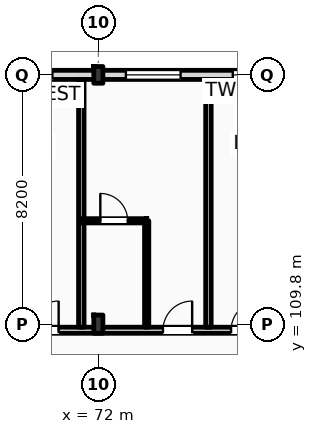
"""IFC4 building model, lengths in metres.
Left out: names, types, materials, properties, quantities, classifications, styles, units other than length and angle.
Written with IfcOpenShell. Run it as: python <this file> out.ifc"""

import sys

from ifc_helpers import new_model, si_unit, direction, frame, frame_2d, origin, origin_2d, place, context, subcontext, project, spatial, rectangle, i_section, extrude, element, fill, save


model = new_model("IFC4")
c1 = context("Model", 3, precision=1e-05, world=origin(), true_north=direction((0.0, 1.0)))
c2 = subcontext(c1, "Body", "Model", "MODEL_VIEW")
j1 = project(units=[si_unit("LENGTHUNIT", "METRE"), si_unit("PLANEANGLEUNIT", "RADIAN")], contexts=[c1])
p1 = place(None, origin())
s1 = spatial("IfcSite", under=j1, at=p1, CompositionType="ELEMENT")
p2 = place(p1, origin())
s2 = spatial("IfcBuilding", under=s1, at=p2, CompositionType="ELEMENT")
p3 = place(p2, frame((0.0, 0.0, 16.2)))
s3 = spatial("IfcBuildingStorey", under=s2, at=p3, CompositionType="ELEMENT", Elevation=16.2)
p4 = place(p3, frame((72.0, 109.8, 0.0), z_axis=(0.0, 0.0, 1.0), x_axis=(1.0, 0.0, 0.0)))
e1 = element("IfcColumn", 1, at=p4, inside=s3, PredefinedType="COLUMN", context=c2, shape_type="SweptSolid", body=[
    extrude(i_section(OverallWidth=0.3, OverallDepth=0.6, WebThickness=0.015, FlangeThickness=0.03, FilletRadius=0.027, at=origin_2d()), origin(), (0.0, 0.0, 1.0), 4.2),
])
p5 = place(p3, frame((72.0, 118.0, 0.0), z_axis=(0.0, 0.0, 1.0), x_axis=(1.0, 0.0, 0.0)))
e2 = element("IfcColumn", 2, at=p5, inside=s3, PredefinedType="COLUMN", context=c2, shape_type="SweptSolid", body=[
    extrude(i_section(OverallWidth=0.3, OverallDepth=0.55, WebThickness=0.015, FlangeThickness=0.029, FilletRadius=0.027, at=origin_2d()), origin(), (0.0, 0.0, 1.0), 4.2),
])
p6 = place(p3, frame((22.5, 118.0, 0.0), z_axis=(0.0, 0.0, 1.0), x_axis=(1.0, 0.0, 0.0)))
e3 = element("IfcWall", 3, at=p6, inside=s3, PredefinedType="STANDARD", context=c2, shape_type="SweptSolid", body=[
    extrude(rectangle(XDim=97.5, YDim=0.3, at=frame_2d((48.75, 0.0))), origin(), (0.0, 0.0, 1.0), 3.36),
])
p7 = place(p6, frame((3.721, 0.0, 0.9)))
e4 = element("IfcOpeningElement", 4, at=p7, cuts=e3, PredefinedType="OPENING", context=c2, shape_type="SweptSolid", body=[
    extrude(rectangle(XDim=0.9, YDim=1.8, at=frame_2d((0.45, 0.9))), frame((0.0, 0.16, 0.0), z_axis=(0.0, -1.0, 0.0), x_axis=(1.0, 0.0, 0.0)), (0.0, 0.0, 1.0), 0.32),
])
p8 = place(p6, frame((6.447, 0.0, 0.9)))
e5 = element("IfcOpeningElement", 5, at=p8, cuts=e3, PredefinedType="OPENING", context=c2, shape_type="SweptSolid", body=[
    extrude(rectangle(XDim=1.35, YDim=1.85, at=frame_2d((0.675, 0.925))), frame((0.0, 0.16, 0.0), z_axis=(0.0, -1.0, 0.0), x_axis=(1.0, 0.0, 0.0)), (0.0, 0.0, 1.0), 0.32),
])
p9 = place(p6, frame((11.363, 0.0, 0.9)))
e6 = element("IfcOpeningElement", 6, at=p9, cuts=e3, PredefinedType="OPENING", context=c2, shape_type="SweptSolid", body=[
    extrude(rectangle(XDim=1.5, YDim=1.9, at=frame_2d((0.75, 0.95))), frame((0.0, 0.16, 0.0), z_axis=(0.0, -1.0, 0.0), x_axis=(1.0, 0.0, 0.0)), (0.0, 0.0, 1.0), 0.32),
])
p10 = place(p6, frame((15.078, 0.0, 0.9)))
e7 = element("IfcOpeningElement", 7, at=p10, cuts=e3, PredefinedType="OPENING", context=c2, shape_type="SweptSolid", body=[
    extrude(rectangle(XDim=1.65, YDim=1.95, at=frame_2d((0.825, 0.975))), frame((0.0, 0.16, 0.0), z_axis=(0.0, -1.0, 0.0), x_axis=(1.0, 0.0, 0.0)), (0.0, 0.0, 1.0), 0.32),
])
p11 = place(p6, frame((19.395, 0.0, 0.9)))
e8 = element("IfcOpeningElement", 8, at=p11, cuts=e3, PredefinedType="OPENING", context=c2, shape_type="SweptSolid", body=[
    extrude(rectangle(XDim=1.8, YDim=2.0, at=frame_2d((0.9, 1.0))), frame((0.0, 0.16, 0.0), z_axis=(0.0, -1.0, 0.0), x_axis=(1.0, 0.0, 0.0)), (0.0, 0.0, 1.0), 0.32),
])
p12 = place(p6, frame((23.31, 0.0, 0.9)))
e9 = element("IfcOpeningElement", 9, at=p12, cuts=e3, PredefinedType="OPENING", context=c2, shape_type="SweptSolid", body=[
    extrude(rectangle(XDim=1.95, YDim=2.05, at=frame_2d((0.975, 1.025))), frame((0.0, 0.16, 0.0), z_axis=(0.0, -1.0, 0.0), x_axis=(1.0, 0.0, 0.0)), (0.0, 0.0, 1.0), 0.32),
])
p13 = place(p6, frame((28.026, 0.0, 0.9)))
e10 = element("IfcOpeningElement", 10, at=p13, cuts=e3, PredefinedType="OPENING", context=c2, shape_type="SweptSolid", body=[
    extrude(rectangle(XDim=2.1, YDim=2.1, at=frame_2d((1.05, 1.05))), frame((0.0, 0.16, 0.0), z_axis=(0.0, -1.0, 0.0), x_axis=(1.0, 0.0, 0.0)), (0.0, 0.0, 1.0), 0.32),
])
p14 = place(p6, frame((31.941, 0.0, 0.9)))
e11 = element("IfcOpeningElement", 11, at=p14, cuts=e3, PredefinedType="OPENING", context=c2, shape_type="SweptSolid", body=[
    extrude(rectangle(XDim=1.1, YDim=2.15, at=frame_2d((0.55, 1.075))), frame((0.0, 0.16, 0.0), z_axis=(0.0, -1.0, 0.0), x_axis=(1.0, 0.0, 0.0)), (0.0, 0.0, 1.0), 0.32),
])
p15 = place(p6, frame((36.657, 0.0, 0.9)))
e12 = element("IfcOpeningElement", 12, at=p15, cuts=e3, PredefinedType="OPENING", context=c2, shape_type="SweptSolid", body=[
    extrude(rectangle(XDim=2.4, YDim=2.2, at=frame_2d((1.2, 1.1))), frame((0.0, 0.16, 0.0), z_axis=(0.0, -1.0, 0.0), x_axis=(1.0, 0.0, 0.0)), (0.0, 0.0, 1.0), 0.32),
])
p16 = place(p6, frame((42.574, 0.0, 0.9)))
e13 = element("IfcOpeningElement", 13, at=p16, cuts=e3, PredefinedType="OPENING", context=c2, shape_type="SweptSolid", body=[
    extrude(rectangle(XDim=1.35, YDim=2.25, at=frame_2d((0.675, 1.125))), frame((0.0, 0.16, 0.0), z_axis=(0.0, -1.0, 0.0), x_axis=(1.0, 0.0, 0.0)), (0.0, 0.0, 1.0), 0.32),
])
p17 = place(p6, frame((45.289, 0.0, 0.9)))
e14 = element("IfcOpeningElement", 14, at=p17, cuts=e3, PredefinedType="OPENING", context=c2, shape_type="SweptSolid", body=[
    extrude(rectangle(XDim=2.7, YDim=2.28, at=frame_2d((1.35, 1.14))), frame((0.0, 0.16, 0.0), z_axis=(0.0, -1.0, 0.0), x_axis=(1.0, 0.0, 0.0)), (0.0, 0.0, 1.0), 0.32),
])
p18 = place(p6, frame((50.406, 0.0, 0.9)))
e15 = element("IfcOpeningElement", 15, at=p18, cuts=e3, PredefinedType="OPENING", context=c2, shape_type="SweptSolid", body=[
    extrude(rectangle(XDim=1.8, YDim=2.28, at=frame_2d((0.9, 1.14))), frame((0.0, 0.16, 0.0), z_axis=(0.0, -1.0, 0.0), x_axis=(1.0, 0.0, 0.0)), (0.0, 0.0, 1.0), 0.32),
])
p19 = place(p6, frame((53.922, 0.0, 0.9)))
e16 = element("IfcOpeningElement", 16, at=p19, cuts=e3, PredefinedType="OPENING", context=c2, shape_type="SweptSolid", body=[
    extrude(rectangle(XDim=1.8, YDim=2.28, at=frame_2d((0.9, 1.14))), frame((0.0, 0.16, 0.0), z_axis=(0.0, -1.0, 0.0), x_axis=(1.0, 0.0, 0.0)), (0.0, 0.0, 1.0), 0.32),
])
p20 = place(p6, frame((58.332, 0.0, 0.9)))
e17 = element("IfcOpeningElement", 17, at=p20, cuts=e3, PredefinedType="OPENING", context=c2, shape_type="SweptSolid", body=[
    extrude(rectangle(XDim=2.961, YDim=2.28, at=frame_2d((1.48, 1.14))), frame((0.0, 0.16, 0.0), z_axis=(0.0, -1.0, 0.0), x_axis=(1.0, 0.0, 0.0)), (0.0, 0.0, 1.0), 0.32),
])
p21 = place(p6, frame((62.513, 0.0, 0.9)))
e18 = element("IfcOpeningElement", 18, at=p21, cuts=e3, PredefinedType="OPENING", context=c2, shape_type="SweptSolid", body=[
    extrude(rectangle(XDim=1.8, YDim=2.28, at=frame_2d((0.9, 1.14))), frame((0.0, 0.16, 0.0), z_axis=(0.0, -1.0, 0.0), x_axis=(1.0, 0.0, 0.0)), (0.0, 0.0, 1.0), 0.32),
])
p22 = place(p6, frame((67.114, 0.0, 0.9)))
e19 = element("IfcOpeningElement", 19, at=p22, cuts=e3, PredefinedType="OPENING", context=c2, shape_type="SweptSolid", body=[
    extrude(rectangle(XDim=2.961, YDim=2.28, at=frame_2d((1.48, 1.14))), frame((0.0, 0.16, 0.0), z_axis=(0.0, -1.0, 0.0), x_axis=(1.0, 0.0, 0.0)), (0.0, 0.0, 1.0), 0.32),
])
p23 = place(p6, frame((73.695, 0.0, 0.9)))
e20 = element("IfcOpeningElement", 20, at=p23, cuts=e3, PredefinedType="OPENING", context=c2, shape_type="SweptSolid", body=[
    extrude(rectangle(XDim=1.1, YDim=2.28, at=frame_2d((0.55, 1.14))), frame((0.0, 0.16, 0.0), z_axis=(0.0, -1.0, 0.0), x_axis=(1.0, 0.0, 0.0)), (0.0, 0.0, 1.0), 0.32),
])
p24 = place(p6, frame((75.895, 0.0, 0.9)))
e21 = element("IfcOpeningElement", 21, at=p24, cuts=e3, PredefinedType="OPENING", context=c2, shape_type="SweptSolid", body=[
    extrude(rectangle(XDim=2.961, YDim=2.28, at=frame_2d((1.48, 1.14))), frame((0.0, 0.16, 0.0), z_axis=(0.0, -1.0, 0.0), x_axis=(1.0, 0.0, 0.0)), (0.0, 0.0, 1.0), 0.32),
])
p25 = place(p6, frame((81.676, 0.0, 0.9)))
e22 = element("IfcOpeningElement", 22, at=p25, cuts=e3, PredefinedType="OPENING", context=c2, shape_type="SweptSolid", body=[
    extrude(rectangle(XDim=1.8, YDim=2.28, at=frame_2d((0.9, 1.14))), frame((0.0, 0.16, 0.0), z_axis=(0.0, -1.0, 0.0), x_axis=(1.0, 0.0, 0.0)), (0.0, 0.0, 1.0), 0.32),
])
p26 = place(p6, frame((84.677, 0.0, 0.9)))
e23 = element("IfcOpeningElement", 23, at=p26, cuts=e3, PredefinedType="OPENING", context=c2, shape_type="SweptSolid", body=[
    extrude(rectangle(XDim=2.961, YDim=2.28, at=frame_2d((1.48, 1.14))), frame((0.0, 0.16, 0.0), z_axis=(0.0, -1.0, 0.0), x_axis=(1.0, 0.0, 0.0)), (0.0, 0.0, 1.0), 0.32),
])
p27 = place(p6, frame((89.999, 0.0, 0.9)))
e24 = element("IfcOpeningElement", 24, at=p27, cuts=e3, PredefinedType="OPENING", context=c2, shape_type="SweptSolid", body=[
    extrude(rectangle(XDim=1.1, YDim=1.5, at=frame_2d((0.55, 0.75))), frame((0.0, 0.16, 0.0), z_axis=(0.0, -1.0, 0.0), x_axis=(1.0, 0.0, 0.0)), (0.0, 0.0, 1.0), 0.32),
])
p28 = place(p6, frame((94.35, 0.0, 0.9)))
e25 = element("IfcOpeningElement", 25, at=p28, cuts=e3, PredefinedType="OPENING", context=c2, shape_type="SweptSolid", body=[
    extrude(rectangle(XDim=1.25, YDim=1.6, at=frame_2d((0.625, 0.8))), frame((0.0, 0.16, 0.0), z_axis=(0.0, -1.0, 0.0), x_axis=(1.0, 0.0, 0.0)), (0.0, 0.0, 1.0), 0.32),
])
p29 = place(p3, frame((10.65, 109.6, 0.0), z_axis=(0.0, 0.0, 1.0), x_axis=(1.0, 0.0, 0.0)))
e26 = element("IfcWall", 26, at=p29, inside=s3, PredefinedType="PARTITIONING", context=c2, shape_type="SweptSolid", body=[
    extrude(rectangle(XDim=109.21, YDim=0.2, at=frame_2d((54.605, 0.0))), origin(), (0.0, 0.0, 1.0), 3.36),
])
p30 = place(p29, frame((15.43, 0.0, 0.0)))
e27 = element("IfcOpeningElement", 27, at=p30, cuts=e26, PredefinedType="OPENING", context=c2, shape_type="SweptSolid", body=[
    extrude(rectangle(XDim=1.02, YDim=2.2, at=frame_2d((0.51, 1.1))), frame((0.0, 0.11, 0.0), z_axis=(0.0, -1.0, 0.0), x_axis=(1.0, 0.0, 0.0)), (0.0, 0.0, 1.0), 0.22),
])
p31 = place(p29, frame((19.537, 0.0, 0.0)))
e28 = element("IfcOpeningElement", 28, at=p31, cuts=e26, PredefinedType="OPENING", context=c2, shape_type="SweptSolid", body=[
    extrude(rectangle(XDim=1.02, YDim=2.2, at=frame_2d((0.51, 1.1))), frame((0.0, 0.11, 0.0), z_axis=(0.0, -1.0, 0.0), x_axis=(1.0, 0.0, 0.0)), (0.0, 0.0, 1.0), 0.22),
])
p32 = place(p29, frame((23.928, 0.0, 0.0)))
e29 = element("IfcOpeningElement", 29, at=p32, cuts=e26, PredefinedType="OPENING", context=c2, shape_type="SweptSolid", body=[
    extrude(rectangle(XDim=1.02, YDim=2.2, at=frame_2d((0.51, 1.1))), frame((0.0, 0.11, 0.0), z_axis=(0.0, -1.0, 0.0), x_axis=(1.0, 0.0, 0.0)), (0.0, 0.0, 1.0), 0.22),
])
p33 = place(p29, frame((26.169, 0.0, 0.0)))
e30 = element("IfcOpeningElement", 30, at=p33, cuts=e26, PredefinedType="OPENING", context=c2, shape_type="SweptSolid", body=[
    extrude(rectangle(XDim=1.02, YDim=2.2, at=frame_2d((0.51, 1.1))), frame((0.0, 0.11, 0.0), z_axis=(0.0, -1.0, 0.0), x_axis=(1.0, 0.0, 0.0)), (0.0, 0.0, 1.0), 0.22),
])
p34 = place(p29, frame((32.739, 0.0, 0.0)))
e31 = element("IfcOpeningElement", 31, at=p34, cuts=e26, PredefinedType="OPENING", context=c2, shape_type="SweptSolid", body=[
    extrude(rectangle(XDim=0.96, YDim=2.2, at=frame_2d((0.48, 1.1))), frame((0.0, 0.11, 0.0), z_axis=(0.0, -1.0, 0.0), x_axis=(1.0, 0.0, 0.0)), (0.0, 0.0, 1.0), 0.22),
])
p35 = place(p29, frame((34.98, 0.0, 0.0)))
e32 = element("IfcOpeningElement", 32, at=p35, cuts=e26, PredefinedType="OPENING", context=c2, shape_type="SweptSolid", body=[
    extrude(rectangle(XDim=0.96, YDim=2.2, at=frame_2d((0.48, 1.1))), frame((0.0, 0.11, 0.0), z_axis=(0.0, -1.0, 0.0), x_axis=(1.0, 0.0, 0.0)), (0.0, 0.0, 1.0), 0.22),
])
p36 = place(p29, frame((41.521, 0.0, 0.0)))
e33 = element("IfcOpeningElement", 33, at=p36, cuts=e26, PredefinedType="OPENING", context=c2, shape_type="SweptSolid", body=[
    extrude(rectangle(XDim=0.96, YDim=2.2, at=frame_2d((0.48, 1.1))), frame((0.0, 0.11, 0.0), z_axis=(0.0, -1.0, 0.0), x_axis=(1.0, 0.0, 0.0)), (0.0, 0.0, 1.0), 0.22),
])
p37 = place(p29, frame((43.512, 0.0, 0.0)))
e34 = element("IfcOpeningElement", 34, at=p37, cuts=e26, PredefinedType="OPENING", context=c2, shape_type="SweptSolid", body=[
    extrude(rectangle(XDim=0.96, YDim=2.2, at=frame_2d((0.48, 1.1))), frame((0.0, 0.11, 0.0), z_axis=(0.0, -1.0, 0.0), x_axis=(1.0, 0.0, 0.0)), (0.0, 0.0, 1.0), 0.22),
])
p38 = place(p29, frame((50.303, 0.0, 0.0)))
e35 = element("IfcOpeningElement", 35, at=p38, cuts=e26, PredefinedType="OPENING", context=c2, shape_type="SweptSolid", body=[
    extrude(rectangle(XDim=0.96, YDim=2.2, at=frame_2d((0.48, 1.1))), frame((0.0, 0.11, 0.0), z_axis=(0.0, -1.0, 0.0), x_axis=(1.0, 0.0, 0.0)), (0.0, 0.0, 1.0), 0.22),
])
p39 = place(p29, frame((54.944, 0.0, 0.0)))
e36 = element("IfcOpeningElement", 36, at=p39, cuts=e26, PredefinedType="OPENING", context=c2, shape_type="SweptSolid", body=[
    extrude(rectangle(XDim=0.96, YDim=2.2, at=frame_2d((0.48, 1.1))), frame((0.0, 0.11, 0.0), z_axis=(0.0, -1.0, 0.0), x_axis=(1.0, 0.0, 0.0)), (0.0, 0.0, 1.0), 0.22),
])
p40 = place(p29, frame((59.085, 0.0, 0.0)))
e37 = element("IfcOpeningElement", 37, at=p40, cuts=e26, PredefinedType="OPENING", context=c2, shape_type="SweptSolid", body=[
    extrude(rectangle(XDim=0.96, YDim=2.2, at=frame_2d((0.48, 1.1))), frame((0.0, 0.11, 0.0), z_axis=(0.0, -1.0, 0.0), x_axis=(1.0, 0.0, 0.0)), (0.0, 0.0, 1.0), 0.22),
])
p41 = place(p29, frame((63.476, 0.0, 0.0)))
e38 = element("IfcOpeningElement", 38, at=p41, cuts=e26, PredefinedType="OPENING", context=c2, shape_type="SweptSolid", body=[
    extrude(rectangle(XDim=0.96, YDim=2.2, at=frame_2d((0.48, 1.1))), frame((0.0, 0.11, 0.0), z_axis=(0.0, -1.0, 0.0), x_axis=(1.0, 0.0, 0.0)), (0.0, 0.0, 1.0), 0.22),
])
p42 = place(p29, frame((65.716, 0.0, 0.0)))
e39 = element("IfcOpeningElement", 39, at=p42, cuts=e26, PredefinedType="OPENING", context=c2, shape_type="SweptSolid", body=[
    extrude(rectangle(XDim=0.96, YDim=2.2, at=frame_2d((0.48, 1.1))), frame((0.0, 0.11, 0.0), z_axis=(0.0, -1.0, 0.0), x_axis=(1.0, 0.0, 0.0)), (0.0, 0.0, 1.0), 0.22),
])
p43 = place(p29, frame((72.257, 0.0, 0.0)))
e40 = element("IfcOpeningElement", 40, at=p43, cuts=e26, PredefinedType="OPENING", context=c2, shape_type="SweptSolid", body=[
    extrude(rectangle(XDim=0.96, YDim=2.2, at=frame_2d((0.48, 1.1))), frame((0.0, 0.11, 0.0), z_axis=(0.0, -1.0, 0.0), x_axis=(1.0, 0.0, 0.0)), (0.0, 0.0, 1.0), 0.22),
])
p44 = place(p29, frame((74.498, 0.0, 0.0)))
e41 = element("IfcOpeningElement", 41, at=p44, cuts=e26, PredefinedType="OPENING", context=c2, shape_type="SweptSolid", body=[
    extrude(rectangle(XDim=0.96, YDim=2.2, at=frame_2d((0.48, 1.1))), frame((0.0, 0.11, 0.0), z_axis=(0.0, -1.0, 0.0), x_axis=(1.0, 0.0, 0.0)), (0.0, 0.0, 1.0), 0.22),
])
p45 = place(p29, frame((81.039, 0.0, 0.0)))
e42 = element("IfcOpeningElement", 42, at=p45, cuts=e26, PredefinedType="OPENING", context=c2, shape_type="SweptSolid", body=[
    extrude(rectangle(XDim=0.96, YDim=2.2, at=frame_2d((0.48, 1.1))), frame((0.0, 0.11, 0.0), z_axis=(0.0, -1.0, 0.0), x_axis=(1.0, 0.0, 0.0)), (0.0, 0.0, 1.0), 0.22),
])
p46 = place(p29, frame((85.68, 0.0, 0.0)))
e43 = element("IfcOpeningElement", 43, at=p46, cuts=e26, PredefinedType="OPENING", context=c2, shape_type="SweptSolid", body=[
    extrude(rectangle(XDim=0.96, YDim=2.2, at=frame_2d((0.48, 1.1))), frame((0.0, 0.11, 0.0), z_axis=(0.0, -1.0, 0.0), x_axis=(1.0, 0.0, 0.0)), (0.0, 0.0, 1.0), 0.22),
])
p47 = place(p29, frame((89.82, 0.0, 0.0)))
e44 = element("IfcOpeningElement", 44, at=p47, cuts=e26, PredefinedType="OPENING", context=c2, shape_type="SweptSolid", body=[
    extrude(rectangle(XDim=0.96, YDim=2.2, at=frame_2d((0.48, 1.1))), frame((0.0, 0.11, 0.0), z_axis=(0.0, -1.0, 0.0), x_axis=(1.0, 0.0, 0.0)), (0.0, 0.0, 1.0), 0.22),
])
p48 = place(p29, frame((94.211, 0.0, 0.0)))
e45 = element("IfcOpeningElement", 45, at=p48, cuts=e26, PredefinedType="OPENING", context=c2, shape_type="SweptSolid", body=[
    extrude(rectangle(XDim=0.96, YDim=2.2, at=frame_2d((0.48, 1.1))), frame((0.0, 0.11, 0.0), z_axis=(0.0, -1.0, 0.0), x_axis=(1.0, 0.0, 0.0)), (0.0, 0.0, 1.0), 0.22),
])
p49 = place(p29, frame((98.602, 0.0, 0.0)))
e46 = element("IfcOpeningElement", 46, at=p49, cuts=e26, PredefinedType="OPENING", context=c2, shape_type="SweptSolid", body=[
    extrude(rectangle(XDim=0.96, YDim=2.2, at=frame_2d((0.48, 1.1))), frame((0.0, 0.11, 0.0), z_axis=(0.0, -1.0, 0.0), x_axis=(1.0, 0.0, 0.0)), (0.0, 0.0, 1.0), 0.22),
])
p50 = place(p29, frame((102.993, 0.0, 0.0)))
e47 = element("IfcOpeningElement", 47, at=p50, cuts=e26, PredefinedType="OPENING", context=c2, shape_type="SweptSolid", body=[
    extrude(rectangle(XDim=0.96, YDim=2.2, at=frame_2d((0.48, 1.1))), frame((0.0, 0.11, 0.0), z_axis=(0.0, -1.0, 0.0), x_axis=(1.0, 0.0, 0.0)), (0.0, 0.0, 1.0), 0.22),
])
p51 = place(p29, frame((105.269, 0.0, 0.0)))
e48 = element("IfcOpeningElement", 48, at=p51, cuts=e26, PredefinedType="OPENING", context=c2, shape_type="SweptSolid", body=[
    extrude(rectangle(XDim=0.96, YDim=2.2, at=frame_2d((0.48, 1.1))), frame((0.0, 0.11, 0.0), z_axis=(0.0, -1.0, 0.0), x_axis=(1.0, 0.0, 0.0)), (0.0, 0.0, 1.0), 0.22),
])
p52 = place(p29, frame((2.716, 0.0, 0.0)))
e49 = element("IfcOpeningElement", 49, at=p52, cuts=e26, PredefinedType="OPENING", context=c2, shape_type="SweptSolid", body=[
    extrude(rectangle(XDim=1.35, YDim=2.25, at=frame_2d((0.675, 1.125))), frame((0.0, 0.11, 0.0), z_axis=(0.0, -1.0, 0.0), x_axis=(1.0, 0.0, 0.0)), (0.0, 0.0, 1.0), 0.22),
])
p53 = place(p29, frame((6.65, 0.0, 0.0)))
e50 = element("IfcOpeningElement", 50, at=p53, cuts=e26, PredefinedType="OPENING", context=c2, shape_type="SweptSolid", body=[
    extrude(rectangle(XDim=1.35, YDim=2.25, at=frame_2d((0.675, 1.125))), frame((0.0, 0.11, 0.0), z_axis=(0.0, -1.0, 0.0), x_axis=(1.0, 0.0, 0.0)), (0.0, 0.0, 1.0), 0.22),
])
p54 = place(p29, frame((10.583, 0.0, 0.0)))
e51 = element("IfcOpeningElement", 51, at=p54, cuts=e26, PredefinedType="OPENING", context=c2, shape_type="SweptSolid", body=[
    extrude(rectangle(XDim=1.35, YDim=2.25, at=frame_2d((0.675, 1.125))), frame((0.0, 0.11, 0.0), z_axis=(0.0, -1.0, 0.0), x_axis=(1.0, 0.0, 0.0)), (0.0, 0.0, 1.0), 0.22),
])
for number, where, z_axis, x_axis in (
    (52, (71.44, 109.7, 0.0), (0.0, 0.0, 1.0), (0.0, 1.0, 0.0)),
    (53, (75.621, 109.7, 0.0), (0.0, 0.0, 1.0), (0.0, 1.0, 0.0)),
):
    element("IfcWall", number, at=place(p3, frame(where, z_axis=z_axis, x_axis=x_axis)), inside=s3, PredefinedType="PARTITIONING", context=c2, shape_type="SweptSolid", body=[
        extrude(rectangle(XDim=8.15, YDim=0.18, at=frame_2d((4.075, 0.0))), origin(), (0.0, 0.0, 1.0), 3.92),
    ])
p55 = place(p3, frame((73.59, 109.7, 0.0), z_axis=(0.0, 0.0, 1.0), x_axis=(0.0, 1.0, 0.0)))
e54 = element("IfcWall", 54, at=p55, inside=s3, PredefinedType="PARTITIONING", context=c2, shape_type="SweptSolid", body=[
    extrude(rectangle(XDim=3.5, YDim=0.14, at=frame_2d((1.75, 0.0))), origin(), (0.0, 0.0, 1.0), 3.92),
])
p56 = place(p3, frame((71.44, 113.2, 0.0), z_axis=(0.0, 0.0, 1.0), x_axis=(1.0, 0.0, 0.0)))
e55 = element("IfcWall", 55, at=p56, inside=s3, PredefinedType="PARTITIONING", context=c2, shape_type="SweptSolid", body=[
    extrude(rectangle(XDim=2.15, YDim=0.14, at=frame_2d((1.075, 0.0))), origin(), (0.0, 0.0, 1.0), 3.92),
])
p57 = place(p56, frame((0.625, 0.0, 0.0)))
e56 = element("IfcOpeningElement", 56, at=p57, cuts=e55, PredefinedType="OPENING", context=c2, shape_type="SweptSolid", body=[
    extrude(rectangle(XDim=0.9, YDim=2.1, at=frame_2d((0.45, 1.05))), frame((0.0, 0.08, 0.0), z_axis=(0.0, -1.0, 0.0), x_axis=(1.0, 0.0, 0.0)), (0.0, 0.0, 1.0), 0.16),
])
p58 = place(p17, origin())
e57 = element("IfcWindow", 57, at=p58, inside=s3, PartitioningType="DOUBLE_PANEL_VERTICAL", PredefinedType="WINDOW", context=c2, shape_type="SweptSolid", body=[
    extrude(rectangle(XDim=2.7, YDim=2.28, at=frame_2d((1.35, 1.14))), frame((0.0, 0.03, 0.0), z_axis=(0.0, -1.0, 0.0), x_axis=(1.0, 0.0, 0.0)), (0.0, 0.0, 1.0), 0.06),
])
fill(e14, e57)
p59 = place(p18, origin())
e58 = element("IfcWindow", 58, at=p59, inside=s3, PartitioningType="DOUBLE_PANEL_VERTICAL", PredefinedType="WINDOW", context=c2, shape_type="SweptSolid", body=[
    extrude(rectangle(XDim=1.8, YDim=2.28, at=frame_2d((0.9, 1.14))), frame((0.0, 0.03, 0.0), z_axis=(0.0, -1.0, 0.0), x_axis=(1.0, 0.0, 0.0)), (0.0, 0.0, 1.0), 0.06),
])
fill(e15, e58)
p60 = place(p19, origin())
e59 = element("IfcWindow", 59, at=p60, inside=s3, PartitioningType="DOUBLE_PANEL_VERTICAL", PredefinedType="WINDOW", context=c2, shape_type="SweptSolid", body=[
    extrude(rectangle(XDim=1.8, YDim=2.28, at=frame_2d((0.9, 1.14))), frame((0.0, 0.03, 0.0), z_axis=(0.0, -1.0, 0.0), x_axis=(1.0, 0.0, 0.0)), (0.0, 0.0, 1.0), 0.06),
])
fill(e16, e59)
p61 = place(p40, origin())
e60 = element("IfcDoor", 60, at=p61, inside=s3, OperationType="SINGLE_SWING_RIGHT", PredefinedType="DOOR", context=c2, shape_type="SweptSolid", body=[
    extrude(rectangle(XDim=0.96, YDim=2.2, at=frame_2d((0.48, 1.1))), frame((0.0, 0.025, 0.0), z_axis=(0.0, -1.0, 0.0), x_axis=(1.0, 0.0, 0.0)), (0.0, 0.0, 1.0), 0.05),
])
fill(e37, e60)
p62 = place(p41, origin())
e61 = element("IfcDoor", 61, at=p62, inside=s3, OperationType="SINGLE_SWING_RIGHT", PredefinedType="DOOR", context=c2, shape_type="SweptSolid", body=[
    extrude(rectangle(XDim=0.96, YDim=2.2, at=frame_2d((0.48, 1.1))), frame((0.0, 0.025, 0.0), z_axis=(0.0, -1.0, 0.0), x_axis=(1.0, 0.0, 0.0)), (0.0, 0.0, 1.0), 0.05),
])
fill(e38, e61)
p63 = place(p57, origin())
e62 = element("IfcDoor", 62, at=p63, inside=s3, OperationType="SINGLE_SWING_LEFT", PredefinedType="DOOR", context=c2, shape_type="SweptSolid", body=[
    extrude(rectangle(XDim=0.9, YDim=2.1, at=frame_2d((0.45, 1.05))), frame((0.0, 0.025, 0.0), z_axis=(0.0, -1.0, 0.0), x_axis=(1.0, 0.0, 0.0)), (0.0, 0.0, 1.0), 0.05),
])
fill(e56, e62)
p64 = place(p42, origin())
e63 = element("IfcDoor", 63, at=p64, inside=s3, OperationType="SINGLE_SWING_RIGHT", PredefinedType="DOOR", context=c2, shape_type="SweptSolid", body=[
    extrude(rectangle(XDim=0.96, YDim=2.2, at=frame_2d((0.48, 1.1))), frame((0.0, 0.025, 0.0), z_axis=(0.0, -1.0, 0.0), x_axis=(1.0, 0.0, 0.0)), (0.0, 0.0, 1.0), 0.05),
])
fill(e39, e63)
save(model, sys.argv[1])
